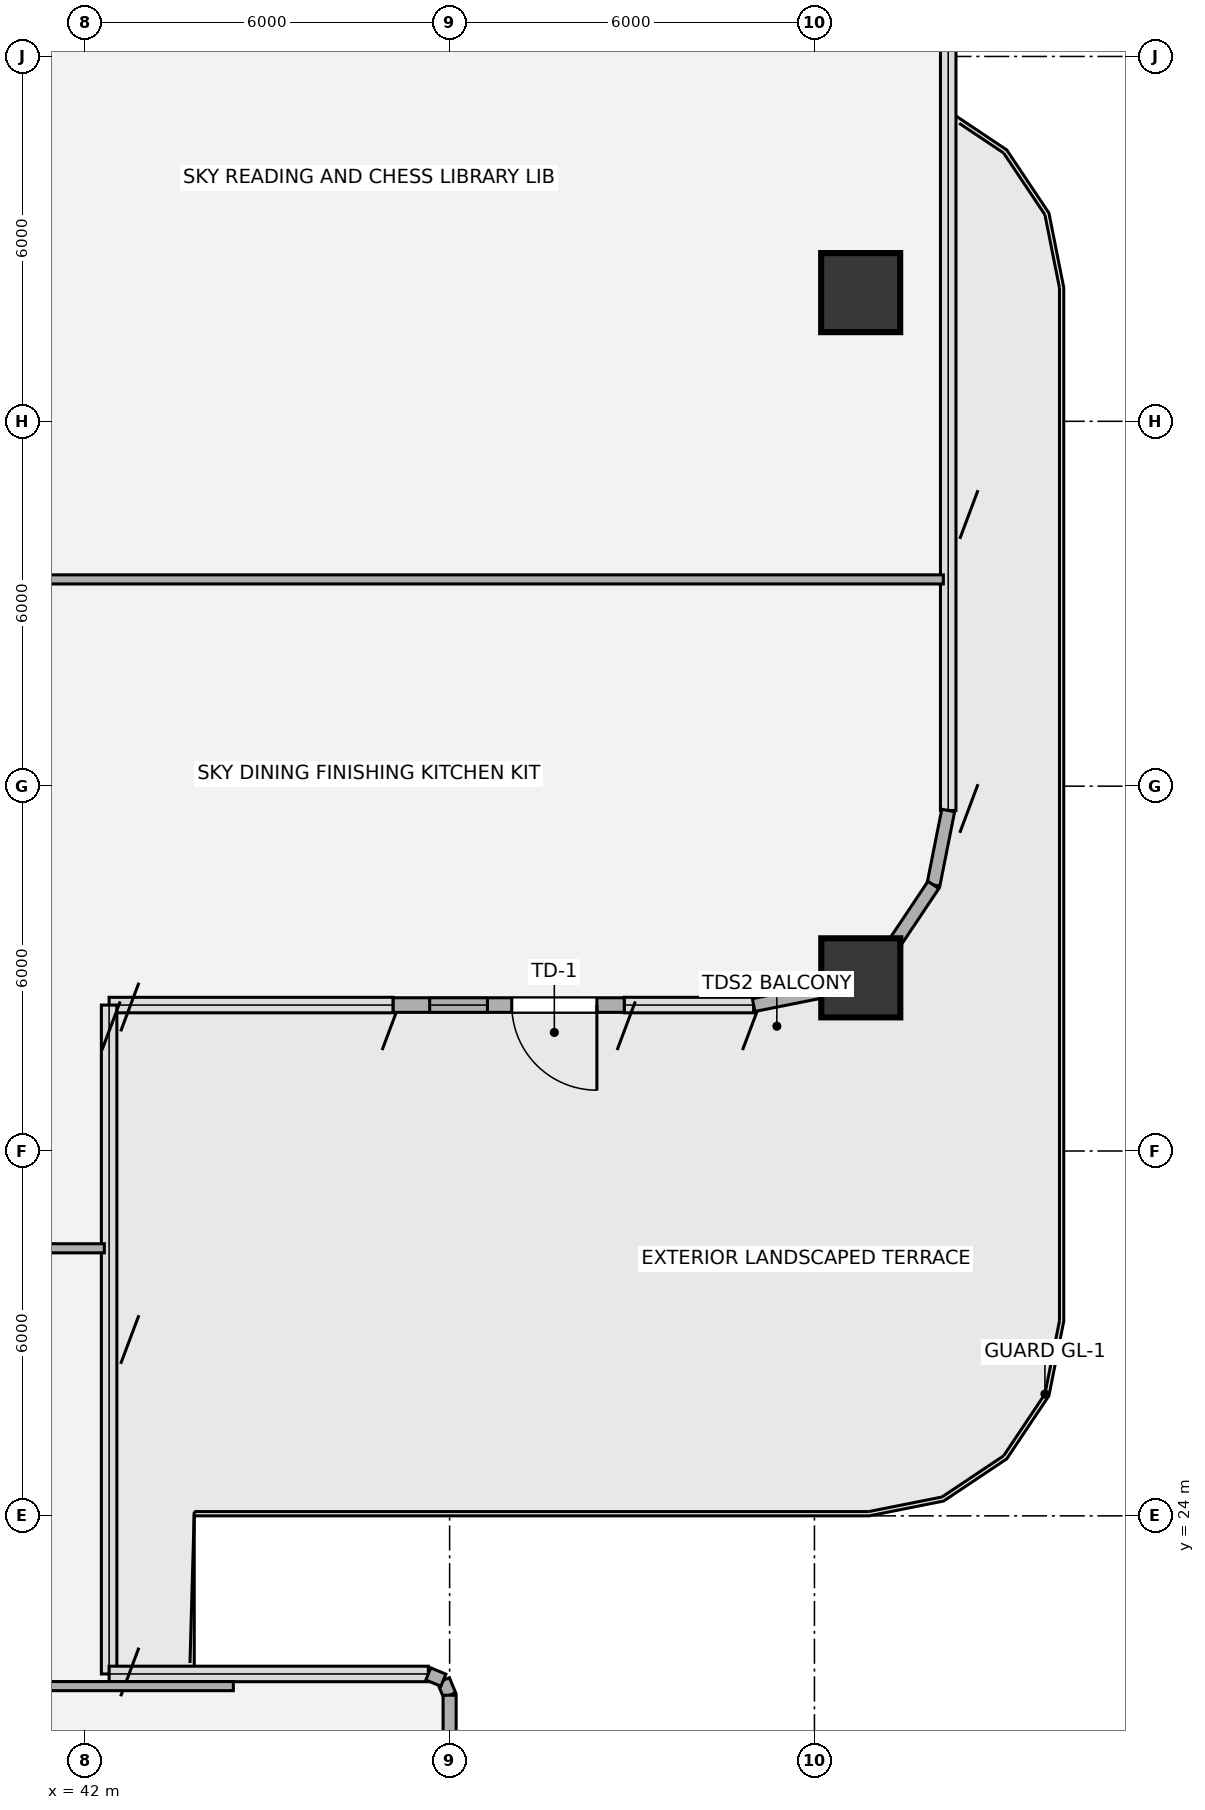
"""IFC4 building model, lengths in metres.
Left out: names, types, materials, properties, quantities, classifications, styles, units other than length and angle.
Written with IfcOpenShell. Run it as: python <this file> out.ifc"""

import sys

from ifc_helpers import new_model, si_unit, direction, frame, frame_2d, origin, origin_2d, place, context, subcontext, project, spatial, rectangle, hollow_circle, extrude, source, transform, mapped, element, fill, save


model = new_model("IFC4")
c1 = context("Model", 3, precision=1e-05, world=origin(), true_north=direction((0.0, 1.0)))
c2 = subcontext(c1, "Body", "Model", "MODEL_VIEW")
j1 = project(units=[si_unit("LENGTHUNIT", "METRE"), si_unit("PLANEANGLEUNIT", "RADIAN")], contexts=[c1])
p1 = place(None, origin())
s1 = spatial("IfcSite", under=j1, at=p1, CompositionType="ELEMENT")
p2 = place(p1, origin())
s2 = spatial("IfcBuilding", under=s1, at=p2, CompositionType="ELEMENT")
p3 = place(p2, frame((0.0, 0.0, 151.92)))
s3 = spatial("IfcBuildingStorey", under=s2, at=p3, CompositionType="ELEMENT", Elevation=151.92)
m1 = source(origin(), c2, "Body", "SweptSolid", [
    extrude(hollow_circle(Radius=0.65, WallThickness=0.045, at=origin_2d()), origin(), (0.0, 0.0, 1.0), 4.717),
])
p4 = place(p3, frame((55.114, 31.405, 0.0), z_axis=(-0.149069248521, 0.611960321271, 0.77671289698), x_axis=(-0.97158950951, -0.236672400185, 0.0)))
e1 = element("IfcColumn", 1, at=p4, inside=s3, PredefinedType="COLUMN", context=c2, shape_type="MappedRepresentation", body=[
    mapped(m1, transform((0.0, 0.0, 0.0), x_axis=(1.0, 0.0, 0.0), y_axis=(0.0, 1.0, 0.0), z_axis=(0.0, 0.0, 1.0), scale=1.0)),
])
m2 = source(origin(), c2, "Body", "SweptSolid", [
    extrude(hollow_circle(Radius=0.65, WallThickness=0.045, at=origin_2d()), origin(), (0.0, 0.0, 1.0), 4.608),
])
p5 = place(p3, frame((55.114, 42.777, 0.0), z_axis=(-0.153340545343, 0.581199876249, 0.79918294589), x_axis=(-0.966913345059, -0.255105043359, 0.0)))
e2 = element("IfcColumn", 2, at=p5, inside=s3, PredefinedType="COLUMN", context=c2, shape_type="MappedRepresentation", body=[
    mapped(m2, transform((0.0, 0.0, 0.0), x_axis=(1.0, 0.0, 0.0), y_axis=(0.0, 1.0, 0.0), z_axis=(0.0, 0.0, 1.0), scale=1.0)),
])
p6 = place(p3, frame((47.897, 21.298, 0.0), z_axis=(0.0, 0.0, 1.0), x_axis=(0.382673670509, -0.923883575944, 0.0)))
e3 = element("IfcWall", 3, at=p6, inside=s3, PredefinedType="SOLIDWALL", context=c2, shape_type="SweptSolid", body=[
    extrude(rectangle(XDim=0.268, YDim=0.215, at=frame_2d((0.134, 0.0))), origin(), (0.0, 0.0, 1.0), 4.092),
])
p7 = place(p3, frame((48.0, 21.05, 0.0), z_axis=(0.0, 0.0, 1.0), x_axis=(0.0, -1.0, 0.0)))
e4 = element("IfcWall", 4, at=p7, inside=s3, PredefinedType="SOLIDWALL", context=c2, shape_type="SweptSolid", body=[
    extrude(rectangle(XDim=2.695, YDim=0.215, at=frame_2d((1.348, 0.0))), origin(), (0.0, 0.0, 1.0), 2.28),
])
for number, where, z_axis, x_axis in (
    (5, (56.2, 35.6, 0.0), (0.0, 0.0, 1.0), (-0.195, -0.981, 0.0)),
    (6, (55.956, 34.375, 0.0), (0.0, 0.0, 1.0), (-0.556, -0.831, 0.0)),
    (7, (55.263, 33.337, 0.0), (0.0, 0.0, 1.0), (-0.831, -0.556, 0.0)),
    (8, (54.225, 32.644, 0.0), (0.0, 0.0, 1.0), (-0.981, -0.195, 0.0)),
):
    element("IfcWall", number, at=place(p3, frame(where, z_axis=z_axis, x_axis=x_axis)), inside=s3, PredefinedType="SOLIDWALL", context=c2, shape_type="SweptSolid", body=[
        extrude(rectangle(XDim=1.249, YDim=0.215, at=frame_2d((0.624, 0.0))), origin(), (0.0, 0.0, 1.0), 4.092),
    ])
p8 = place(p3, frame((50.872, 32.4, 0.0), z_axis=(0.0, 0.0, 1.0), x_axis=(-1.0, 0.0, 0.0)))
e9 = element("IfcWall", 9, at=p8, inside=s3, PredefinedType="SOLIDWALL", context=c2, shape_type="SweptSolid", body=[
    extrude(rectangle(XDim=3.8, YDim=0.24, at=frame_2d((1.9, 0.0))), origin(), (0.0, 0.0, 1.0), 4.092),
])
p9 = place(p8, frame((0.45, 0.0, 0.0)))
e10 = element("IfcOpeningElement", 10, at=p9, cuts=e9, PredefinedType="OPENING", context=c2, shape_type="SweptSolid", body=[
    extrude(rectangle(XDim=1.4, YDim=2.15, at=origin_2d()), frame((0.7, 0.13, 1.075), z_axis=(0.0, -1.0, 0.0), x_axis=(1.0, 0.0, 0.0)), (0.0, 0.0, 1.0), 0.26),
])
p10 = place(p8, frame((2.25, 0.0, 0.85)))
e11 = element("IfcOpeningElement", 11, at=p10, cuts=e9, PredefinedType="OPENING", context=c2, shape_type="SweptSolid", body=[
    extrude(rectangle(XDim=0.95, YDim=1.35, at=origin_2d()), frame((0.475, 0.13, 0.675), z_axis=(0.0, -1.0, 0.0), x_axis=(1.0, 0.0, 0.0)), (0.0, 0.0, 1.0), 0.26),
])
p11 = place(p3, frame((47.65, 21.4, 0.0), z_axis=(0.0, 0.0, 1.0), x_axis=(0.924205486139, -0.381895560841, 0.0)))
e12 = element("IfcWall", 12, at=p11, inside=s3, PredefinedType="SOLIDWALL", context=c2, shape_type="SweptSolid", body=[
    extrude(rectangle(XDim=0.268, YDim=0.215, at=frame_2d((0.134, 0.0))), origin(), (0.0, 0.0, 1.0), 4.092),
])
p12 = place(p3, frame((37.2, 21.2, 0.0), z_axis=(0.0, 0.0, 1.0), x_axis=(1.0, 0.0, 0.0)))
e13 = element("IfcWall", 13, at=p12, inside=s3, PredefinedType="PARTITIONING", context=c2, shape_type="SweptSolid", body=[
    extrude(rectangle(XDim=7.243, YDim=0.15, at=frame_2d((3.621, 0.0))), origin(), (0.0, 0.0, 1.0), 4.062),
])
p13 = place(p3, frame((37.2, 28.4, 0.0), z_axis=(0.0, 0.0, 1.0), x_axis=(1.0, 0.0, 0.0)))
e14 = element("IfcWall", 14, at=p13, inside=s3, PredefinedType="PARTITIONING", context=c2, shape_type="SweptSolid", body=[
    extrude(rectangle(XDim=5.121, YDim=0.15, at=frame_2d((2.561, 0.0))), origin(), (0.0, 0.0, 1.0), 4.062),
])
p14 = place(p3, frame((37.2, 39.4, 0.0), z_axis=(0.0, 0.0, 1.0), x_axis=(1.0, 0.0, 0.0)))
e15 = element("IfcWall", 15, at=p14, inside=s3, PredefinedType="PARTITIONING", context=c2, shape_type="SweptSolid", body=[
    extrude(rectangle(XDim=18.92, YDim=0.15, at=frame_2d((9.46, 0.0))), origin(), (0.0, 0.0, 1.0), 3.544),
])
m3 = source(origin(), c2, "Body", "SweptSolid", [
    extrude(rectangle(XDim=1.4, YDim=2.15, at=origin_2d()), frame((0.7, 0.025, 1.075), z_axis=(0.0, -1.0, 0.0), x_axis=(1.0, 0.0, 0.0)), (0.0, 0.0, 1.0), 0.05),
])
p15 = place(p9, origin())
e16 = element("IfcDoor", 16, at=p15, inside=s3, OperationType="SINGLE_SWING_LEFT", PredefinedType="DOOR", context=c2, shape_type="MappedRepresentation", body=[
    mapped(m3, transform((0.0, 0.0, 0.0), x_axis=(1.0, 0.0, 0.0), y_axis=(0.0, 1.0, 0.0), z_axis=(0.0, 0.0, 1.0), scale=1.0)),
])
fill(e10, e16)
m4 = source(origin(), c2, "Body", "SweptSolid", [
    extrude(rectangle(XDim=0.95, YDim=1.35, at=origin_2d()), frame((0.475, 0.03, 0.675), z_axis=(0.0, -1.0, 0.0), x_axis=(1.0, 0.0, 0.0)), (0.0, 0.0, 1.0), 0.06),
])
p16 = place(p10, origin())
e17 = element("IfcWindow", 17, at=p16, inside=s3, PartitioningType="SINGLE_PANEL", PredefinedType="WINDOW", context=c2, shape_type="MappedRepresentation", body=[
    mapped(m4, transform((0.0, 0.0, 0.0), x_axis=(1.0, 0.0, 0.0), y_axis=(0.0, 1.0, 0.0), z_axis=(0.0, 0.0, 1.0), scale=1.0)),
])
fill(e11, e17)
save(model, sys.argv[1])
